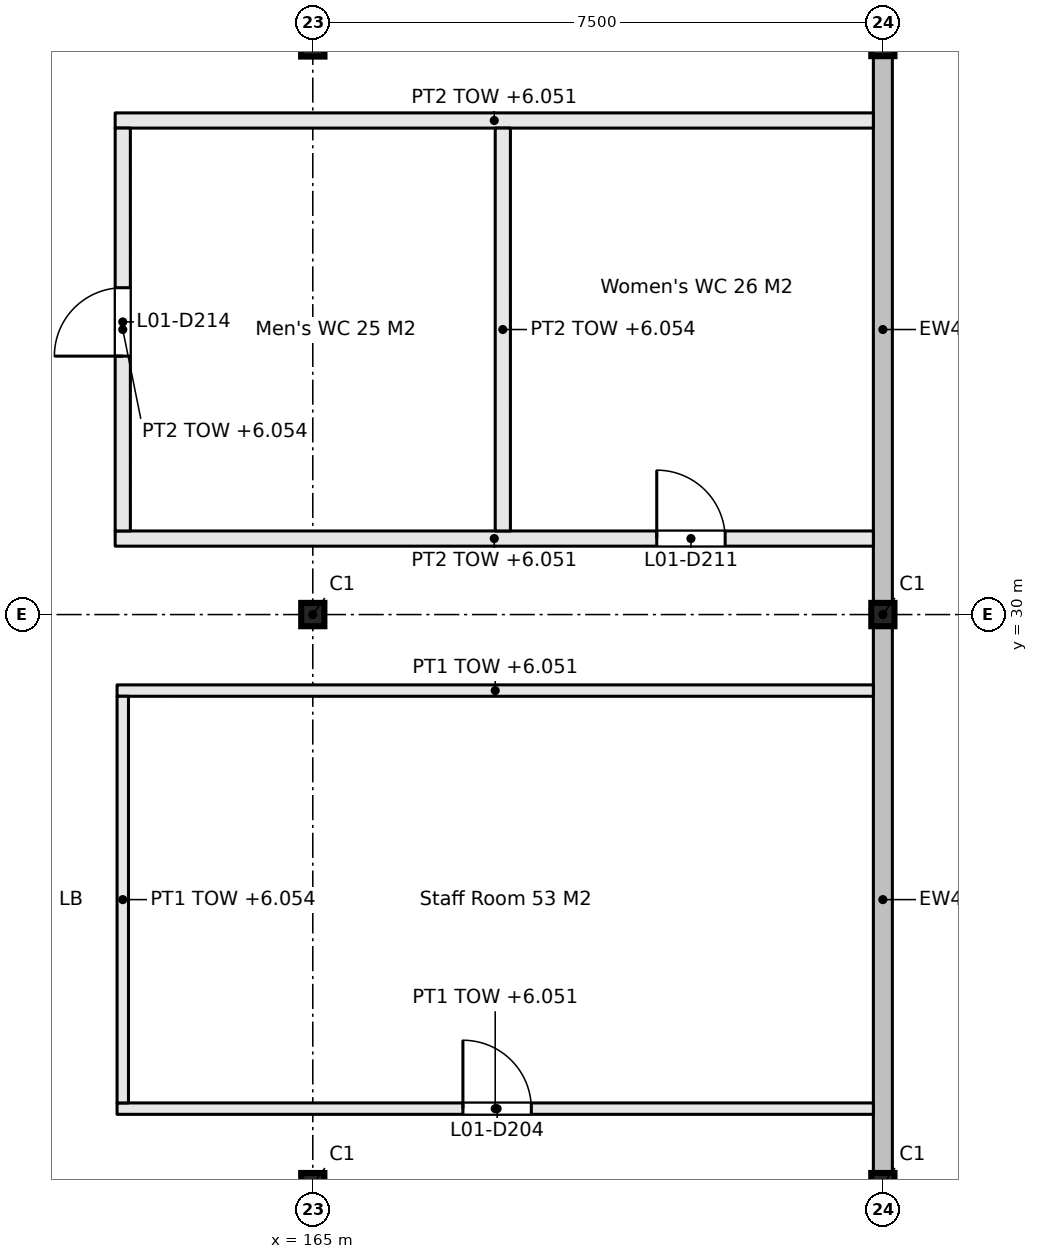
"""IFC4 building model, lengths in metres.
Left out: names, types, materials, properties, quantities, classifications, styles, units other than length and angle.
Written with IfcOpenShell. Run it as: python <this file> out.ifc"""

import sys

from ifc_helpers import new_model, si_unit, direction, frame, frame_2d, origin, origin_2d, place, context, subcontext, project, spatial, rectangle, i_section, extrude, element, fill, save


model = new_model("IFC4")
c1 = context("Model", 3, precision=1e-05, world=origin(), true_north=direction((0.0, 1.0)))
c2 = subcontext(c1, "Body", "Model", "MODEL_VIEW")
j1 = project(units=[si_unit("LENGTHUNIT", "METRE"), si_unit("PLANEANGLEUNIT", "RADIAN")], contexts=[c1])
p1 = place(None, origin())
s1 = spatial("IfcSite", under=j1, at=p1, CompositionType="ELEMENT")
p2 = place(p1, origin())
s2 = spatial("IfcBuilding", under=s1, at=p2, CompositionType="ELEMENT")
p3 = place(p2, frame((0.0, 0.0, 3.3)))
s3 = spatial("IfcBuildingStorey", under=s2, at=p3, CompositionType="ELEMENT", Elevation=3.3)
for number, where, z_axis, x_axis in (
    (1, (165.0, 22.5, 0.0), (0.0, 0.0, 1.0), (1.0, 0.0, 0.0)),
    (2, (165.0, 30.0, 0.0), (0.0, 0.0, 1.0), (1.0, 0.0, 0.0)),
):
    element("IfcColumn", number, at=place(p3, frame(where, z_axis=z_axis, x_axis=x_axis)), inside=s3, PredefinedType="COLUMN", context=c2, shape_type="SweptSolid", body=[
        extrude(i_section(OverallWidth=0.305, OverallDepth=0.307, WebThickness=0.01, FlangeThickness=0.015, FilletRadius=0.015, at=origin_2d()), origin(), (0.0, 0.0, 1.0), 3.3),
    ])
p4 = place(p3, frame((165.0, 37.5, 0.0), z_axis=(0.0, 0.0, 1.0), x_axis=(1.0, 0.0, 0.0)))
e3 = element("IfcColumn", 3, at=p4, inside=s3, PredefinedType="COLUMN", context=c2, shape_type="SweptSolid", body=[
    extrude(i_section(OverallWidth=0.307, OverallDepth=0.318, WebThickness=0.013, FlangeThickness=0.021, FilletRadius=0.015, at=origin_2d()), origin(), (0.0, 0.0, 1.0), 3.3),
])
for number, where, z_axis, x_axis in (
    (4, (172.5, 22.5, 0.0), (0.0, 0.0, 1.0), (1.0, 0.0, 0.0)),
    (5, (172.5, 30.0, 0.0), (0.0, 0.0, 1.0), (1.0, 0.0, 0.0)),
    (6, (172.5, 37.5, 0.0), (0.0, 0.0, 1.0), (1.0, 0.0, 0.0)),
):
    element("IfcColumn", number, at=place(p3, frame(where, z_axis=z_axis, x_axis=x_axis)), inside=s3, PredefinedType="COLUMN", context=c2, shape_type="SweptSolid", body=[
        extrude(i_section(OverallWidth=0.305, OverallDepth=0.307, WebThickness=0.01, FlangeThickness=0.015, FilletRadius=0.015, at=origin_2d()), origin(), (0.0, 0.0, 1.0), 3.3),
    ])
p5 = place(p3, frame((162.425, 23.5, 0.0), z_axis=(0.0, 0.0, 1.0), x_axis=(1.0, 0.0, 0.0)))
e7 = element("IfcWall", 7, at=p5, inside=s3, PredefinedType="PARTITIONING", context=c2, shape_type="SweptSolid", body=[
    extrude(rectangle(XDim=9.95, YDim=0.15, at=frame_2d((4.975, 0.0))), origin(), (0.0, 0.0, 1.0), 2.751),
])
p6 = place(p5, frame((4.55, 0.0, 0.0)))
e8 = element("IfcOpeningElement", 8, at=p6, cuts=e7, PredefinedType="OPENING", context=c2, shape_type="SweptSolid", body=[
    extrude(rectangle(XDim=0.9, YDim=2.1, at=frame_2d((0.45, 1.05))), frame((0.0, 0.085, 0.0), z_axis=(0.0, -1.0, 0.0), x_axis=(1.0, 0.0, 0.0)), (0.0, 0.0, 1.0), 0.17),
])
p7 = place(p3, frame((162.425, 29.0, 0.0), z_axis=(0.0, 0.0, 1.0), x_axis=(1.0, 0.0, 0.0)))
e9 = element("IfcWall", 9, at=p7, inside=s3, PredefinedType="PARTITIONING", context=c2, shape_type="SweptSolid", body=[
    extrude(rectangle(XDim=9.95, YDim=0.15, at=frame_2d((4.975, 0.0))), origin(), (0.0, 0.0, 1.0), 2.751),
])
p8 = place(p3, frame((162.4, 31.0, 0.0), z_axis=(0.0, 0.0, 1.0), x_axis=(1.0, 0.0, 0.0)))
e10 = element("IfcWall", 10, at=p8, inside=s3, PredefinedType="PARTITIONING", context=c2, shape_type="SweptSolid", body=[
    extrude(rectangle(XDim=9.975, YDim=0.2, at=frame_2d((4.988, 0.0))), origin(), (0.0, 0.0, 1.0), 2.751),
])
p9 = place(p8, frame((7.125, 0.0, 0.0)))
e11 = element("IfcOpeningElement", 11, at=p9, cuts=e10, PredefinedType="OPENING", context=c2, shape_type="SweptSolid", body=[
    extrude(rectangle(XDim=0.9, YDim=2.1, at=frame_2d((0.45, 1.05))), frame((0.0, 0.11, 0.0), z_axis=(0.0, -1.0, 0.0), x_axis=(1.0, 0.0, 0.0)), (0.0, 0.0, 1.0), 0.22),
])
p10 = place(p3, frame((162.4, 36.5, 0.0), z_axis=(0.0, 0.0, 1.0), x_axis=(1.0, 0.0, 0.0)))
e12 = element("IfcWall", 12, at=p10, inside=s3, PredefinedType="PARTITIONING", context=c2, shape_type="SweptSolid", body=[
    extrude(rectangle(XDim=9.975, YDim=0.2, at=frame_2d((4.988, 0.0))), origin(), (0.0, 0.0, 1.0), 2.751),
])
p11 = place(p3, frame((162.5, 23.575, 0.0), z_axis=(0.0, 0.0, 1.0), x_axis=(0.0, 1.0, 0.0)))
e13 = element("IfcWall", 13, at=p11, inside=s3, PredefinedType="PARTITIONING", context=c2, shape_type="SweptSolid", body=[
    extrude(rectangle(XDim=5.35, YDim=0.15, at=frame_2d((2.675, 0.0))), origin(), (0.0, 0.0, 1.0), 2.754),
])
p12 = place(p3, frame((162.5, 31.1, 0.0), z_axis=(0.0, 0.0, 1.0), x_axis=(0.0, 1.0, 0.0)))
e14 = element("IfcWall", 14, at=p12, inside=s3, PredefinedType="PARTITIONING", context=c2, shape_type="SweptSolid", body=[
    extrude(rectangle(XDim=5.3, YDim=0.2, at=frame_2d((2.65, 0.0))), origin(), (0.0, 0.0, 1.0), 2.754),
])
p13 = place(p12, frame((2.3, 0.0, 0.0)))
e15 = element("IfcOpeningElement", 15, at=p13, cuts=e14, PredefinedType="OPENING", context=c2, shape_type="SweptSolid", body=[
    extrude(rectangle(XDim=0.9, YDim=2.1, at=frame_2d((0.45, 1.05))), frame((0.0, 0.11, 0.0), z_axis=(0.0, -1.0, 0.0), x_axis=(1.0, 0.0, 0.0)), (0.0, 0.0, 1.0), 0.22),
])
p14 = place(p3, frame((167.5, 31.1, 0.0), z_axis=(0.0, 0.0, 1.0), x_axis=(0.0, 1.0, 0.0)))
e16 = element("IfcWall", 16, at=p14, inside=s3, PredefinedType="PARTITIONING", context=c2, shape_type="SweptSolid", body=[
    extrude(rectangle(XDim=5.3, YDim=0.2, at=frame_2d((2.65, 0.0))), origin(), (0.0, 0.0, 1.0), 2.754),
])
for number, where, z_axis, x_axis in (
    (17, (172.5, 22.654, 0.0), (0.0, 0.0, 1.0), (0.0, 1.0, 0.0)),
    (18, (172.5, 30.154, 0.0), (0.0, 0.0, 1.0), (0.0, 1.0, 0.0)),
):
    element("IfcWall", number, at=place(p3, frame(where, z_axis=z_axis, x_axis=x_axis)), inside=s3, PredefinedType="SOLIDWALL", context=c2, shape_type="SweptSolid", body=[
        extrude(rectangle(XDim=7.193, YDim=0.25, at=frame_2d((3.596, 0.0))), origin(), (0.0, 0.0, 1.0), 2.751),
    ])
p15 = place(p6, origin())
e19 = element("IfcDoor", 19, at=p15, inside=s3, OperationType="SINGLE_SWING_LEFT", PredefinedType="DOOR", context=c2, shape_type="SweptSolid", body=[
    extrude(rectangle(XDim=0.9, YDim=2.1, at=frame_2d((0.45, 1.05))), frame((0.0, 0.025, 0.0), z_axis=(0.0, -1.0, 0.0), x_axis=(1.0, 0.0, 0.0)), (0.0, 0.0, 1.0), 0.05),
])
fill(e8, e19)
p16 = place(p9, origin())
e20 = element("IfcDoor", 20, at=p16, inside=s3, OperationType="SINGLE_SWING_RIGHT", PredefinedType="DOOR", context=c2, shape_type="SweptSolid", body=[
    extrude(rectangle(XDim=0.9, YDim=2.1, at=frame_2d((0.45, 1.05))), frame((0.0, 0.025, 0.0), z_axis=(0.0, -1.0, 0.0), x_axis=(1.0, 0.0, 0.0)), (0.0, 0.0, 1.0), 0.05),
])
fill(e11, e20)
p17 = place(p13, origin())
e21 = element("IfcDoor", 21, at=p17, inside=s3, OperationType="SINGLE_SWING_RIGHT", PredefinedType="DOOR", context=c2, shape_type="SweptSolid", body=[
    extrude(rectangle(XDim=0.9, YDim=2.1, at=frame_2d((0.45, 1.05))), frame((0.0, 0.025, 0.0), z_axis=(0.0, -1.0, 0.0), x_axis=(1.0, 0.0, 0.0)), (0.0, 0.0, 1.0), 0.05),
])
fill(e15, e21)
save(model, sys.argv[1])
